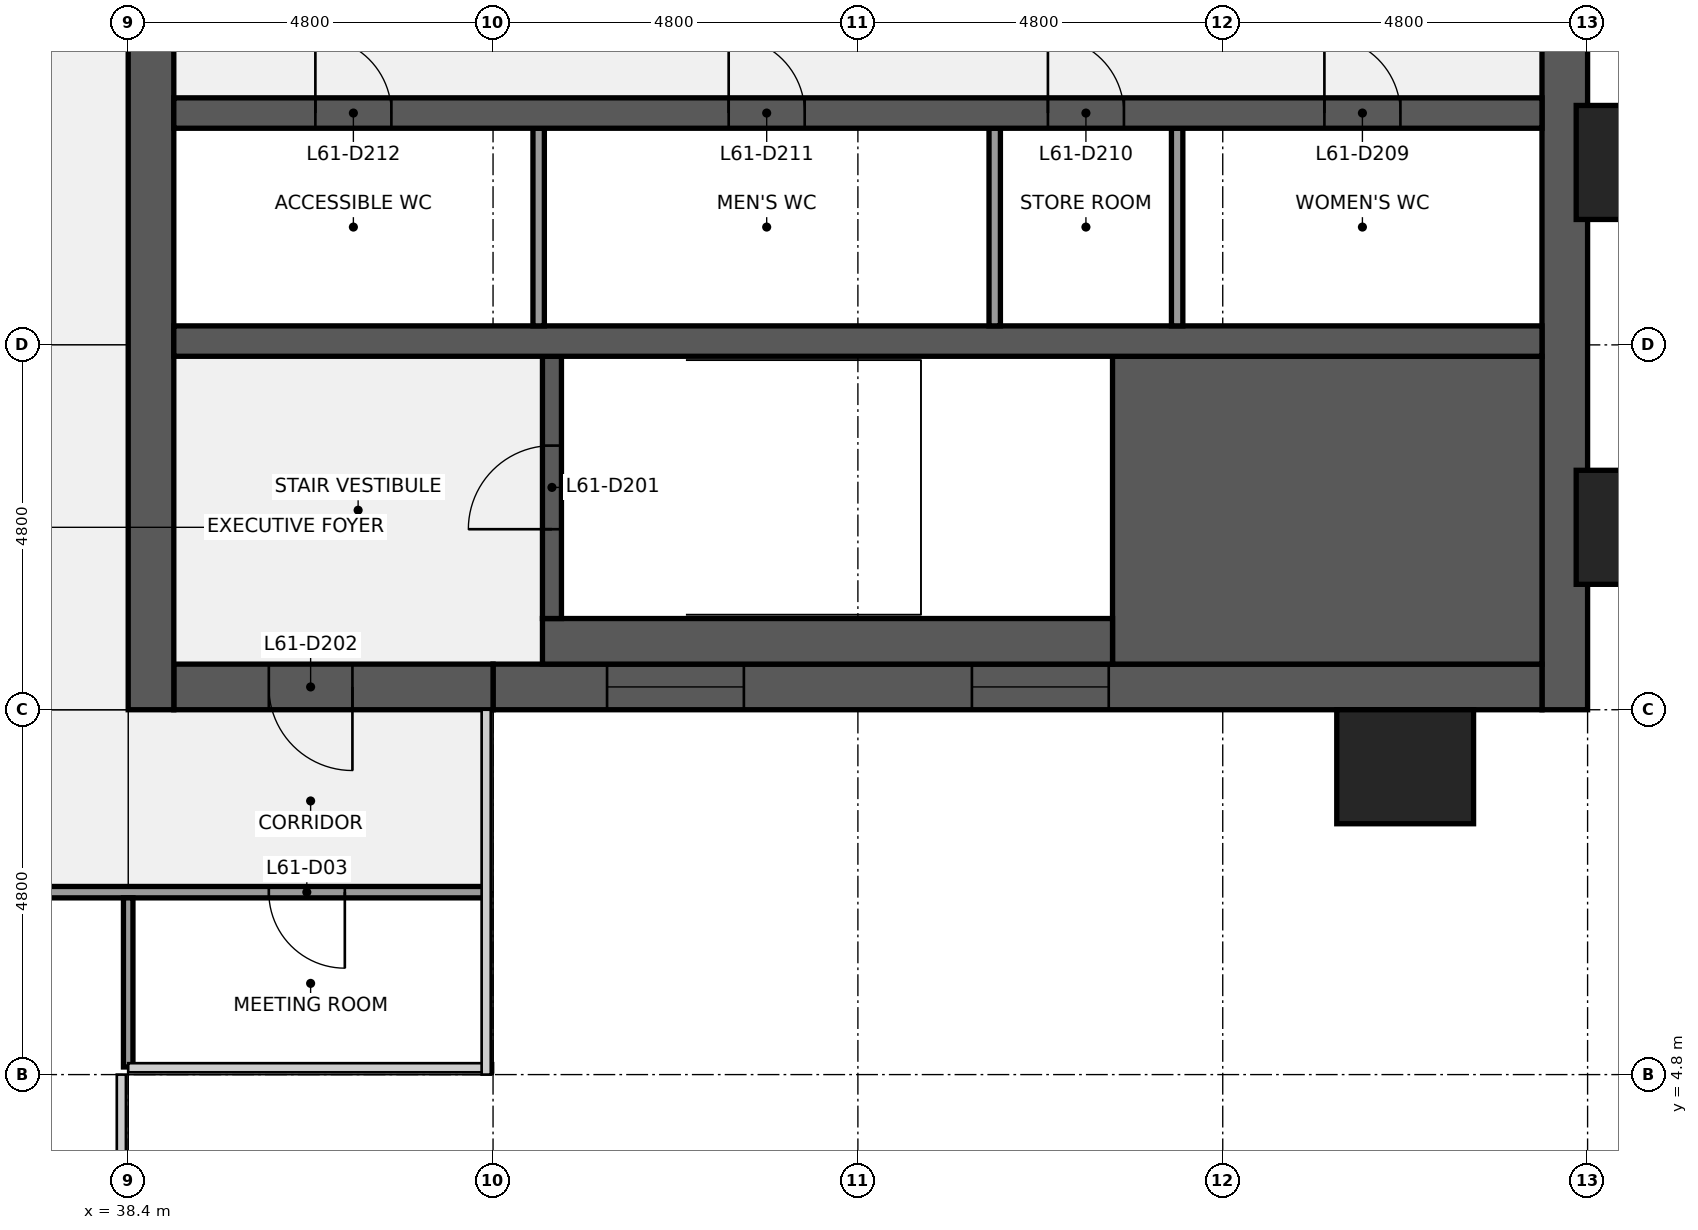
"""IFC4 building model, lengths in metres.
Left out: names, types, materials, properties, quantities, classifications, styles, units other than length and angle.
Written with IfcOpenShell. Run it as: python <this file> out.ifc"""

import sys

from ifc_helpers import new_model, si_unit, direction, frame, frame_2d, origin, origin_2d, place, context, subcontext, project, spatial, rectangle, extrude, element, fill, save


model = new_model("IFC4")
c1 = context("Model", 3, precision=1e-05, world=origin(), true_north=direction((0.0, 1.0)))
c2 = subcontext(c1, "Body", "Model", "MODEL_VIEW")
j1 = project(units=[si_unit("LENGTHUNIT", "METRE"), si_unit("PLANEANGLEUNIT", "RADIAN")], contexts=[c1])
p1 = place(None, origin())
s1 = spatial("IfcSite", under=j1, at=p1, CompositionType="ELEMENT")
p2 = place(p1, origin())
s2 = spatial("IfcBuilding", under=s1, at=p2, CompositionType="ELEMENT")
p3 = place(p2, frame((0.0, 0.0, 282.3)))
s3 = spatial("IfcBuildingStorey", under=s2, at=p3, CompositionType="ELEMENT", Elevation=282.3)
p4 = place(p3, frame((57.3, 38.4, 0.0), z_axis=(0.0, 0.0, 1.0), x_axis=(0.0, -1.0, 0.0)))
e1 = element("IfcWall", 1, at=p4, inside=s3, PredefinedType="SHEAR", context=c2, shape_type="SweptSolid", body=[
    extrude(rectangle(XDim=28.8, YDim=0.6, at=frame_2d((14.4, 0.0))), origin(), (0.0, 0.0, 1.0), 3.84),
])
p5 = place(p4, frame((18.45, 0.0, 0.9)))
e2 = element("IfcOpeningElement", 2, at=p5, cuts=e1, PredefinedType="OPENING", context=c2, shape_type="SweptSolid", body=[
    extrude(rectangle(XDim=1.5, YDim=1.5, at=frame_2d((0.75, 0.75))), frame((0.0, 0.31, 0.0), z_axis=(0.0, -1.0, 0.0), x_axis=(1.0, 0.0, 0.0)), (0.0, 0.0, 1.0), 0.62),
])
p6 = place(p4, frame((8.85, 0.0, 0.9)))
e3 = element("IfcOpeningElement", 3, at=p6, cuts=e1, PredefinedType="OPENING", context=c2, shape_type="SweptSolid", body=[
    extrude(rectangle(XDim=1.5, YDim=1.5, at=frame_2d((0.75, 0.75))), frame((0.0, 0.31, 0.0), z_axis=(0.0, -1.0, 0.0), x_axis=(1.0, 0.0, 0.0)), (0.0, 0.0, 1.0), 0.62),
])
p7 = place(p3, frame((57.0, 9.9, 0.0), z_axis=(0.0, 0.0, 1.0), x_axis=(-1.0, 0.0, 0.0)))
e4 = element("IfcWall", 4, at=p7, inside=s3, PredefinedType="SHEAR", context=c2, shape_type="SweptSolid", body=[
    extrude(rectangle(XDim=13.8, YDim=0.6, at=frame_2d((6.9, 0.0))), origin(), (0.0, 0.0, 1.0), 3.84),
])
p8 = place(p7, frame((5.7, 0.0, 0.9)))
e5 = element("IfcOpeningElement", 5, at=p8, cuts=e4, PredefinedType="OPENING", context=c2, shape_type="SweptSolid", body=[
    extrude(rectangle(XDim=1.8, YDim=1.5, at=frame_2d((0.9, 0.75))), frame((0.0, 0.31, 0.0), z_axis=(0.0, -1.0, 0.0), x_axis=(1.0, 0.0, 0.0)), (0.0, 0.0, 1.0), 0.62),
])
p9 = place(p7, frame((10.5, 0.0, 0.9)))
e6 = element("IfcOpeningElement", 6, at=p9, cuts=e4, PredefinedType="OPENING", context=c2, shape_type="SweptSolid", body=[
    extrude(rectangle(XDim=1.8, YDim=1.5, at=frame_2d((0.9, 0.75))), frame((0.0, 0.31, 0.0), z_axis=(0.0, -1.0, 0.0), x_axis=(1.0, 0.0, 0.0)), (0.0, 0.0, 1.0), 0.62),
])
p10 = place(p3, frame((43.2, 9.9, 0.0), z_axis=(0.0, 0.0, 1.0), x_axis=(-1.0, 0.0, 0.0)))
e7 = element("IfcWall", 7, at=p10, inside=s3, PredefinedType="SHEAR", context=c2, shape_type="SweptSolid", body=[
    extrude(rectangle(XDim=4.2, YDim=0.6, at=frame_2d((2.1, 0.0))), origin(), (0.0, 0.0, 1.0), 3.84),
])
p11 = place(p10, frame((1.85, 0.0, 0.0)))
e8 = element("IfcOpeningElement", 8, at=p11, cuts=e7, PredefinedType="OPENING", context=c2, shape_type="SweptSolid", body=[
    extrude(rectangle(XDim=1.1, YDim=2.1, at=frame_2d((0.55, 1.05))), frame((0.0, 0.31, 0.0), z_axis=(0.0, -1.0, 0.0), x_axis=(1.0, 0.0, 0.0)), (0.0, 0.0, 1.0), 0.62),
])
p12 = place(p3, frame((38.7, 9.6, 0.0), z_axis=(0.0, 0.0, 1.0), x_axis=(0.0, 1.0, 0.0)))
e9 = element("IfcWall", 9, at=p12, inside=s3, PredefinedType="SHEAR", context=c2, shape_type="SweptSolid", body=[
    extrude(rectangle(XDim=28.8, YDim=0.6, at=frame_2d((14.4, 0.0))), origin(), (0.0, 0.0, 1.0), 3.84),
])
p13 = place(p12, frame((8.7, 0.0, 0.0)))
e10 = element("IfcOpeningElement", 10, at=p13, cuts=e9, PredefinedType="OPENING", context=c2, shape_type="SweptSolid", body=[
    extrude(rectangle(XDim=1.8, YDim=2.1, at=frame_2d((0.9, 1.05))), frame((0.0, 0.31, 0.0), z_axis=(0.0, -1.0, 0.0), x_axis=(1.0, 0.0, 0.0)), (0.0, 0.0, 1.0), 0.62),
])
p14 = place(p12, frame((18.3, 0.0, 0.0)))
e11 = element("IfcOpeningElement", 11, at=p14, cuts=e9, PredefinedType="OPENING", context=c2, shape_type="SweptSolid", body=[
    extrude(rectangle(XDim=1.8, YDim=2.1, at=frame_2d((0.9, 1.05))), frame((0.0, 0.31, 0.0), z_axis=(0.0, -1.0, 0.0), x_axis=(1.0, 0.0, 0.0)), (0.0, 0.0, 1.0), 0.62),
])
p15 = place(p3, frame((51.35, 12.225, 0.0), z_axis=(0.0, 0.0, 1.0), x_axis=(1.0, 0.0, 0.0)))
e12 = element("IfcWall", 12, at=p15, inside=s3, PredefinedType="SHEAR", context=c2, shape_type="SweptSolid", body=[
    extrude(rectangle(XDim=5.65, YDim=4.05, at=frame_2d((2.825, 0.0))), origin(), (0.0, 0.0, 1.0), 3.84),
])
p16 = place(p3, frame((43.85, 10.5, 0.0), z_axis=(0.0, 0.0, 1.0), x_axis=(1.0, 0.0, 0.0)))
e13 = element("IfcWall", 13, at=p16, inside=s3, PredefinedType="SHEAR", context=c2, shape_type="SweptSolid", body=[
    extrude(rectangle(XDim=7.5, YDim=0.6, at=frame_2d((3.75, 0.0))), origin(), (0.0, 0.0, 1.0), 3.84),
])
p17 = place(p3, frame((43.975, 10.8, 0.0), z_axis=(0.0, 0.0, 1.0), x_axis=(0.0, 1.0, 0.0)))
e14 = element("IfcWall", 14, at=p17, inside=s3, PredefinedType="SHEAR", context=c2, shape_type="SweptSolid", body=[
    extrude(rectangle(XDim=3.45, YDim=0.25, at=frame_2d((1.725, 0.0))), origin(), (0.0, 0.0, 1.0), 3.84),
])
p18 = place(p17, frame((1.175, 0.0, 0.0)))
e15 = element("IfcOpeningElement", 15, at=p18, cuts=e14, PredefinedType="OPENING", context=c2, shape_type="SweptSolid", body=[
    extrude(rectangle(XDim=1.1, YDim=2.1, at=frame_2d((0.55, 1.05))), frame((0.0, 0.135, 0.0), z_axis=(0.0, -1.0, 0.0), x_axis=(1.0, 0.0, 0.0)), (0.0, 0.0, 1.0), 0.27),
])
p19 = place(p3, frame((39.0, 14.45, 0.0), z_axis=(0.0, 0.0, 1.0), x_axis=(1.0, 0.0, 0.0)))
e16 = element("IfcWall", 16, at=p19, inside=s3, PredefinedType="SHEAR", context=c2, shape_type="SweptSolid", body=[
    extrude(rectangle(XDim=18.0, YDim=0.4, at=frame_2d((9.0, 0.0))), origin(), (0.0, 0.0, 1.0), 3.84),
])
for number, where, z_axis, x_axis in (
    (17, (52.2, 14.65, 0.0), (0.0, 0.0, 1.0), (0.0, 1.0, 0.0)),
    (18, (49.8, 14.65, 0.0), (0.0, 0.0, 1.0), (0.0, 1.0, 0.0)),
    (19, (43.8, 14.65, 0.0), (0.0, 0.0, 1.0), (0.0, 1.0, 0.0)),
):
    element("IfcWall", number, at=place(p3, frame(where, z_axis=z_axis, x_axis=x_axis)), inside=s3, PredefinedType="PARTITIONING", context=c2, shape_type="SweptSolid", body=[
        extrude(rectangle(XDim=2.6, YDim=0.15, at=frame_2d((1.3, 0.0))), origin(), (0.0, 0.0, 1.0), 3.84),
    ])
p20 = place(p3, frame((39.0, 17.45, 0.0), z_axis=(0.0, 0.0, 1.0), x_axis=(1.0, 0.0, 0.0)))
e20 = element("IfcWall", 20, at=p20, inside=s3, PredefinedType="SHEAR", context=c2, shape_type="SweptSolid", body=[
    extrude(rectangle(XDim=18.0, YDim=0.4, at=frame_2d((9.0, 0.0))), origin(), (0.0, 0.0, 1.0), 3.84),
])
p21 = place(p20, frame((15.137, 0.0, 0.0)))
e21 = element("IfcOpeningElement", 21, at=p21, cuts=e20, PredefinedType="OPENING", context=c2, shape_type="SweptSolid", body=[
    extrude(rectangle(XDim=1.0, YDim=2.1, at=frame_2d((0.5, 1.05))), frame((0.0, 0.21, 0.0), z_axis=(0.0, -1.0, 0.0), x_axis=(1.0, 0.0, 0.0)), (0.0, 0.0, 1.0), 0.42),
])
p22 = place(p20, frame((11.5, 0.0, 0.0)))
e22 = element("IfcOpeningElement", 22, at=p22, cuts=e20, PredefinedType="OPENING", context=c2, shape_type="SweptSolid", body=[
    extrude(rectangle(XDim=1.0, YDim=2.1, at=frame_2d((0.5, 1.05))), frame((0.0, 0.21, 0.0), z_axis=(0.0, -1.0, 0.0), x_axis=(1.0, 0.0, 0.0)), (0.0, 0.0, 1.0), 0.42),
])
p23 = place(p20, frame((7.3, 0.0, 0.0)))
e23 = element("IfcOpeningElement", 23, at=p23, cuts=e20, PredefinedType="OPENING", context=c2, shape_type="SweptSolid", body=[
    extrude(rectangle(XDim=1.0, YDim=2.1, at=frame_2d((0.5, 1.05))), frame((0.0, 0.21, 0.0), z_axis=(0.0, -1.0, 0.0), x_axis=(1.0, 0.0, 0.0)), (0.0, 0.0, 1.0), 0.42),
])
p24 = place(p20, frame((1.863, 0.0, 0.0)))
e24 = element("IfcOpeningElement", 24, at=p24, cuts=e20, PredefinedType="OPENING", context=c2, shape_type="SweptSolid", body=[
    extrude(rectangle(XDim=1.0, YDim=2.1, at=frame_2d((0.5, 1.05))), frame((0.0, 0.21, 0.0), z_axis=(0.0, -1.0, 0.0), x_axis=(1.0, 0.0, 0.0)), (0.0, 0.0, 1.0), 0.42),
])
p25 = place(p3, frame((14.5, 7.2, 0.0), z_axis=(0.0, 0.0, 1.0), x_axis=(1.0, 0.0, 0.0)))
e25 = element("IfcWall", 25, at=p25, inside=s3, PredefinedType="PARTITIONING", context=c2, shape_type="SweptSolid", body=[
    extrude(rectangle(XDim=28.6, YDim=0.15, at=frame_2d((14.3, 0.0))), origin(), (0.0, 0.0, 1.0), 2.87),
])
p26 = place(p25, frame((1.85, 0.0, 0.0)))
e26 = element("IfcOpeningElement", 26, at=p26, cuts=e25, PredefinedType="OPENING", context=c2, shape_type="SweptSolid", body=[
    extrude(rectangle(XDim=1.0, YDim=2.1, at=frame_2d((0.5, 1.05))), frame((0.0, 0.085, 0.0), z_axis=(0.0, -1.0, 0.0), x_axis=(1.0, 0.0, 0.0)), (0.0, 0.0, 1.0), 0.17),
])
p27 = place(p25, frame((13.8, 0.0, 0.0)))
e27 = element("IfcOpeningElement", 27, at=p27, cuts=e25, PredefinedType="OPENING", context=c2, shape_type="SweptSolid", body=[
    extrude(rectangle(XDim=1.0, YDim=2.1, at=frame_2d((0.5, 1.05))), frame((0.0, 0.085, 0.0), z_axis=(0.0, -1.0, 0.0), x_axis=(1.0, 0.0, 0.0)), (0.0, 0.0, 1.0), 0.17),
])
p28 = place(p25, frame((25.75, 0.0, 0.0)))
e28 = element("IfcOpeningElement", 28, at=p28, cuts=e25, PredefinedType="OPENING", context=c2, shape_type="SweptSolid", body=[
    extrude(rectangle(XDim=1.0, YDim=2.1, at=frame_2d((0.5, 1.05))), frame((0.0, 0.085, 0.0), z_axis=(0.0, -1.0, 0.0), x_axis=(1.0, 0.0, 0.0)), (0.0, 0.0, 1.0), 0.17),
])
p29 = place(p3, frame((38.4, 4.9, 0.0), z_axis=(0.0, 0.0, 1.0), x_axis=(0.0, 1.0, 0.0)))
e29 = element("IfcWall", 29, at=p29, inside=s3, PredefinedType="PARTITIONING", context=c2, shape_type="SweptSolid", body=[
    extrude(rectangle(XDim=2.225, YDim=0.125, at=frame_2d((1.113, 0.0))), origin(), (0.0, 0.0, 1.0), 2.87),
])
for number, where, z_axis, x_axis in (
    (30, (55.2, 8.85, 0.0), (0.0, 0.0, 1.0), (1.0, 0.0, 0.0)),
    (31, (58.35, 12.0, 0.0), (0.0, 0.0, 1.0), (0.0, 1.0, 0.0)),
    (32, (58.35, 16.8, 0.0), (0.0, 0.0, 1.0), (0.0, 1.0, 0.0)),
):
    element("IfcColumn", number, at=place(p3, frame(where, z_axis=z_axis, x_axis=x_axis)), inside=s3, PredefinedType="PILASTER", context=c2, shape_type="SweptSolid", body=[
        extrude(rectangle(XDim=1.8, YDim=1.5, at=origin_2d()), origin(), (0.0, 0.0, 1.0), 4.0),
    ])
p30 = place(p18, origin())
e33 = element("IfcDoor", 33, at=p30, inside=s3, OperationType="SINGLE_SWING_LEFT", PredefinedType="DOOR", context=c2, shape_type="SweptSolid", body=[
    extrude(rectangle(XDim=1.1, YDim=2.1, at=frame_2d((0.55, 1.05))), frame((0.0, 0.025, 0.0), z_axis=(0.0, -1.0, 0.0), x_axis=(1.0, 0.0, 0.0)), (0.0, 0.0, 1.0), 0.05),
])
fill(e15, e33)
p31 = place(p11, origin())
e34 = element("IfcDoor", 34, at=p31, inside=s3, OperationType="SINGLE_SWING_LEFT", PredefinedType="DOOR", context=c2, shape_type="SweptSolid", body=[
    extrude(rectangle(XDim=1.1, YDim=2.1, at=frame_2d((0.55, 1.05))), frame((0.0, 0.025, 0.0), z_axis=(0.0, -1.0, 0.0), x_axis=(1.0, 0.0, 0.0)), (0.0, 0.0, 1.0), 0.05),
])
fill(e8, e34)
p32 = place(p21, origin())
e35 = element("IfcDoor", 35, at=p32, inside=s3, OperationType="SINGLE_SWING_LEFT", PredefinedType="DOOR", context=c2, shape_type="SweptSolid", body=[
    extrude(rectangle(XDim=1.0, YDim=2.1, at=frame_2d((0.5, 1.05))), frame((0.0, 0.025, 0.0), z_axis=(0.0, -1.0, 0.0), x_axis=(1.0, 0.0, 0.0)), (0.0, 0.0, 1.0), 0.05),
])
fill(e21, e35)
p33 = place(p22, origin())
e36 = element("IfcDoor", 36, at=p33, inside=s3, OperationType="SINGLE_SWING_LEFT", PredefinedType="DOOR", context=c2, shape_type="SweptSolid", body=[
    extrude(rectangle(XDim=1.0, YDim=2.1, at=frame_2d((0.5, 1.05))), frame((0.0, 0.025, 0.0), z_axis=(0.0, -1.0, 0.0), x_axis=(1.0, 0.0, 0.0)), (0.0, 0.0, 1.0), 0.05),
])
fill(e22, e36)
p34 = place(p23, origin())
e37 = element("IfcDoor", 37, at=p34, inside=s3, OperationType="SINGLE_SWING_LEFT", PredefinedType="DOOR", context=c2, shape_type="SweptSolid", body=[
    extrude(rectangle(XDim=1.0, YDim=2.1, at=frame_2d((0.5, 1.05))), frame((0.0, 0.025, 0.0), z_axis=(0.0, -1.0, 0.0), x_axis=(1.0, 0.0, 0.0)), (0.0, 0.0, 1.0), 0.05),
])
fill(e23, e37)
p35 = place(p24, origin())
e38 = element("IfcDoor", 38, at=p35, inside=s3, OperationType="SINGLE_SWING_LEFT", PredefinedType="DOOR", context=c2, shape_type="SweptSolid", body=[
    extrude(rectangle(XDim=1.0, YDim=2.1, at=frame_2d((0.5, 1.05))), frame((0.0, 0.025, 0.0), z_axis=(0.0, -1.0, 0.0), x_axis=(1.0, 0.0, 0.0)), (0.0, 0.0, 1.0), 0.05),
])
fill(e24, e38)
p36 = place(p8, origin())
e39 = element("IfcWindow", 39, at=p36, inside=s3, PartitioningType="SINGLE_PANEL", PredefinedType="WINDOW", context=c2, shape_type="SweptSolid", body=[
    extrude(rectangle(XDim=1.8, YDim=1.5, at=frame_2d((0.9, 0.75))), frame((0.0, 0.03, 0.0), z_axis=(0.0, -1.0, 0.0), x_axis=(1.0, 0.0, 0.0)), (0.0, 0.0, 1.0), 0.06),
])
fill(e5, e39)
p37 = place(p9, origin())
e40 = element("IfcWindow", 40, at=p37, inside=s3, PartitioningType="SINGLE_PANEL", PredefinedType="WINDOW", context=c2, shape_type="SweptSolid", body=[
    extrude(rectangle(XDim=1.8, YDim=1.5, at=frame_2d((0.9, 0.75))), frame((0.0, 0.03, 0.0), z_axis=(0.0, -1.0, 0.0), x_axis=(1.0, 0.0, 0.0)), (0.0, 0.0, 1.0), 0.06),
])
fill(e6, e40)
p38 = place(p28, origin())
e41 = element("IfcDoor", 41, at=p38, inside=s3, OperationType="SINGLE_SWING_RIGHT", PredefinedType="DOOR", context=c2, shape_type="SweptSolid", body=[
    extrude(rectangle(XDim=1.0, YDim=2.1, at=frame_2d((0.5, 1.05))), frame((0.0, 0.025, 0.0), z_axis=(0.0, -1.0, 0.0), x_axis=(1.0, 0.0, 0.0)), (0.0, 0.0, 1.0), 0.05),
])
fill(e28, e41)
save(model, sys.argv[1])
